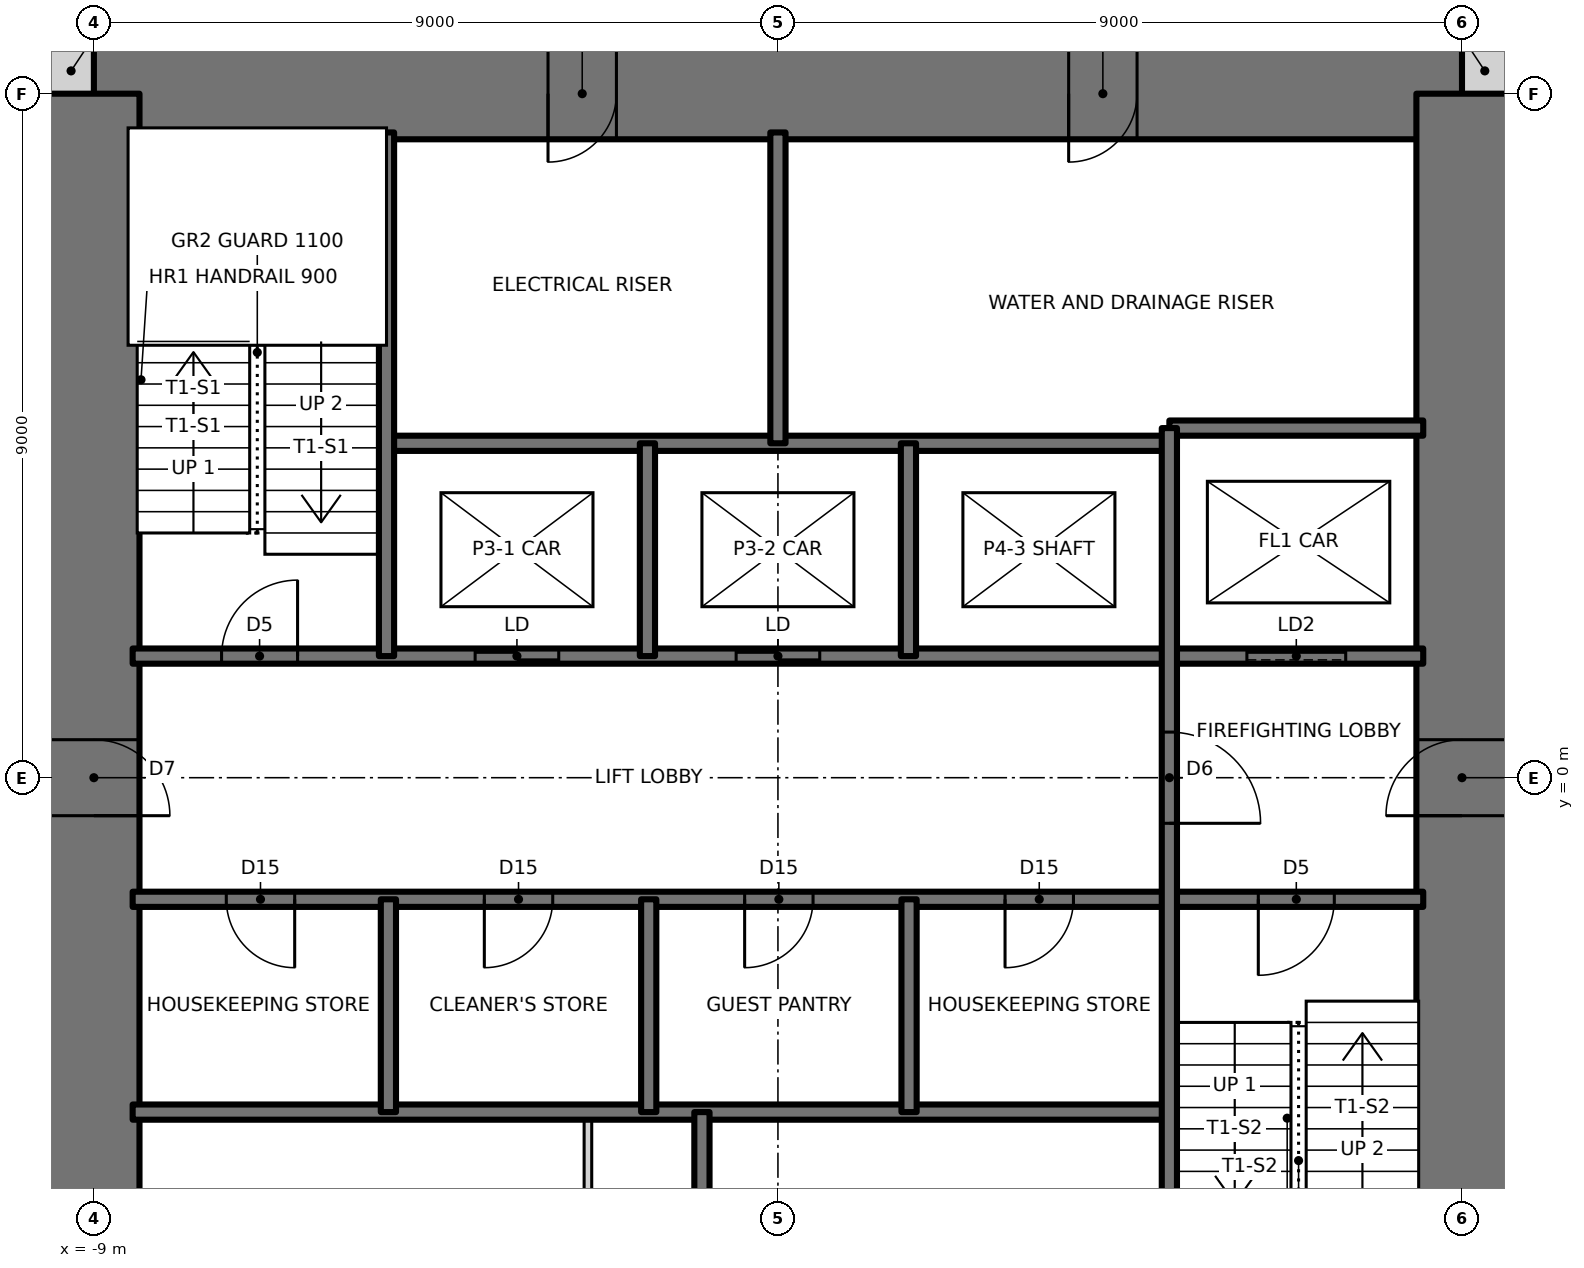
"""IFC4 building model, lengths in metres.
Left out: names, types, materials, properties, quantities, classifications, styles, units other than length and angle.
Written with IfcOpenShell. Run it as: python <this file> out.ifc"""

import sys

from ifc_helpers import new_model, si_unit, direction, frame, frame_2d, origin, place, context, subcontext, project, spatial, rectangle, extrude, element, fill, save


model = new_model("IFC4")
c1 = context("Model", 3, precision=1e-05, world=origin(), true_north=direction((0.0, 1.0)))
c2 = subcontext(c1, "Body", "Model", "MODEL_VIEW")
j1 = project(units=[si_unit("LENGTHUNIT", "METRE"), si_unit("PLANEANGLEUNIT", "RADIAN")], contexts=[c1])
p1 = place(None, origin())
s1 = spatial("IfcSite", under=j1, at=p1, CompositionType="ELEMENT")
p2 = place(p1, origin())
s2 = spatial("IfcBuilding", under=s1, at=p2, CompositionType="ELEMENT")
p3 = place(p2, frame((0.0, 0.0, 156.5)))
s3 = spatial("IfcBuildingStorey", under=s2, at=p3, CompositionType="ELEMENT", Elevation=156.5)
for number, where, z_axis, x_axis in (
    (1, (9.0, 9.3, 0.0), (0.0, 0.0, 1.0), (1.0, 0.0, 0.0)),
    (2, (-9.6, 9.3, 0.0), (0.0, 0.0, 1.0), (1.0, 0.0, 0.0)),
):
    element("IfcWall", number, at=place(p3, frame(where, z_axis=z_axis, x_axis=x_axis)), inside=s3, PredefinedType="SOLIDWALL", context=c2, shape_type="SweptSolid", body=[
        extrude(rectangle(XDim=0.6, YDim=0.6, at=frame_2d((0.3, 0.0))), origin(), (0.0, 0.0, 1.0), 3.5),
    ])
p4 = place(p3, frame((9.0, 9.0, 0.0), z_axis=(0.0, 0.0, 1.0), x_axis=(-1.0, 0.0, 0.0)))
e3 = element("IfcWall", 3, at=p4, inside=s3, PredefinedType="SHEAR", context=c2, shape_type="SweptSolid", body=[
    extrude(rectangle(XDim=18.0, YDim=1.2, at=frame_2d((9.0, 0.0))), origin(), (0.0, 0.0, 1.0), 3.5),
])
p5 = place(p4, frame((11.125, 0.0, 0.0)))
e4 = element("IfcOpeningElement", 4, at=p5, cuts=e3, PredefinedType="OPENING", context=c2, shape_type="SweptSolid", body=[
    extrude(rectangle(XDim=0.9, YDim=2.1, at=frame_2d((0.45, 1.05))), frame((0.0, 0.61, 0.0), z_axis=(0.0, -1.0, 0.0), x_axis=(1.0, 0.0, 0.0)), (0.0, 0.0, 1.0), 1.22),
])
p6 = place(p4, frame((4.275, 0.0, 0.0)))
e5 = element("IfcOpeningElement", 5, at=p6, cuts=e3, PredefinedType="OPENING", context=c2, shape_type="SweptSolid", body=[
    extrude(rectangle(XDim=0.9, YDim=2.1, at=frame_2d((0.45, 1.05))), frame((0.0, 0.61, 0.0), z_axis=(0.0, -1.0, 0.0), x_axis=(1.0, 0.0, 0.0)), (0.0, 0.0, 1.0), 1.22),
])
p7 = place(p3, frame((9.0, -9.0, 0.0), z_axis=(0.0, 0.0, 1.0), x_axis=(0.0, 1.0, 0.0)))
e6 = element("IfcWall", 6, at=p7, inside=s3, PredefinedType="SHEAR", context=c2, shape_type="SweptSolid", body=[
    extrude(rectangle(XDim=18.0, YDim=1.2, at=frame_2d((9.0, 0.0))), origin(), (0.0, 0.0, 1.0), 3.5),
])
p8 = place(p7, frame((8.5, 0.0, 0.0)))
e7 = element("IfcOpeningElement", 7, at=p8, cuts=e6, PredefinedType="OPENING", context=c2, shape_type="SweptSolid", body=[
    extrude(rectangle(XDim=1.0, YDim=2.1, at=frame_2d((0.5, 1.05))), frame((0.0, 0.61, 0.0), z_axis=(0.0, -1.0, 0.0), x_axis=(1.0, 0.0, 0.0)), (0.0, 0.0, 1.0), 1.22),
])
p9 = place(p3, frame((-9.0, 9.0, 0.0), z_axis=(0.0, 0.0, 1.0), x_axis=(0.0, -1.0, 0.0)))
e8 = element("IfcWall", 8, at=p9, inside=s3, PredefinedType="SHEAR", context=c2, shape_type="SweptSolid", body=[
    extrude(rectangle(XDim=18.0, YDim=1.2, at=frame_2d((9.0, 0.0))), origin(), (0.0, 0.0, 1.0), 3.5),
])
p10 = place(p9, frame((8.5, 0.0, 0.0)))
e9 = element("IfcOpeningElement", 9, at=p10, cuts=e8, PredefinedType="OPENING", context=c2, shape_type="SweptSolid", body=[
    extrude(rectangle(XDim=1.0, YDim=2.1, at=frame_2d((0.5, 1.05))), frame((0.0, 0.61, 0.0), z_axis=(0.0, -1.0, 0.0), x_axis=(1.0, 0.0, 0.0)), (0.0, 0.0, 1.0), 1.22),
])
p11 = place(p3, frame((-8.49, -4.4, 0.0), z_axis=(0.0, 0.0, 1.0), x_axis=(1.0, 0.0, 0.0)))
e10 = element("IfcWall", 10, at=p11, inside=s3, PredefinedType="SOLIDWALL", context=c2, shape_type="SweptSolid", body=[
    extrude(rectangle(XDim=13.64, YDim=0.2, at=frame_2d((6.82, 0.0))), origin(), (0.0, 0.0, 1.0), 3.5),
])
p12 = place(p3, frame((-8.49, -1.6, 0.0), z_axis=(0.0, 0.0, 1.0), x_axis=(1.0, 0.0, 0.0)))
e11 = element("IfcWall", 11, at=p12, inside=s3, PredefinedType="SOLIDWALL", context=c2, shape_type="SweptSolid", body=[
    extrude(rectangle(XDim=16.98, YDim=0.2, at=frame_2d((8.49, 0.0))), origin(), (0.0, 0.0, 1.0), 3.5),
])
p13 = place(p12, frame((14.81, 0.0, 0.0)))
e12 = element("IfcOpeningElement", 12, at=p13, cuts=e11, PredefinedType="OPENING", context=c2, shape_type="SweptSolid", body=[
    extrude(rectangle(XDim=1.0, YDim=2.1, at=frame_2d((0.5, 1.05))), frame((0.0, 0.11, 0.0), z_axis=(0.0, -1.0, 0.0), x_axis=(1.0, 0.0, 0.0)), (0.0, 0.0, 1.0), 0.22),
])
p14 = place(p12, frame((1.232, 0.0, 0.0)))
e13 = element("IfcOpeningElement", 13, at=p14, cuts=e11, PredefinedType="OPENING", context=c2, shape_type="SweptSolid", body=[
    extrude(rectangle(XDim=0.9, YDim=2.1, at=frame_2d((0.45, 1.05))), frame((0.0, 0.11, 0.0), z_axis=(0.0, -1.0, 0.0), x_axis=(1.0, 0.0, 0.0)), (0.0, 0.0, 1.0), 0.22),
])
p15 = place(p12, frame((4.627, 0.0, 0.0)))
e14 = element("IfcOpeningElement", 14, at=p15, cuts=e11, PredefinedType="OPENING", context=c2, shape_type="SweptSolid", body=[
    extrude(rectangle(XDim=0.9, YDim=2.1, at=frame_2d((0.45, 1.05))), frame((0.0, 0.11, 0.0), z_axis=(0.0, -1.0, 0.0), x_axis=(1.0, 0.0, 0.0)), (0.0, 0.0, 1.0), 0.22),
])
p16 = place(p12, frame((8.052, 0.0, 0.0)))
e15 = element("IfcOpeningElement", 15, at=p16, cuts=e11, PredefinedType="OPENING", context=c2, shape_type="SweptSolid", body=[
    extrude(rectangle(XDim=0.9, YDim=2.1, at=frame_2d((0.45, 1.05))), frame((0.0, 0.11, 0.0), z_axis=(0.0, -1.0, 0.0), x_axis=(1.0, 0.0, 0.0)), (0.0, 0.0, 1.0), 0.22),
])
p17 = place(p12, frame((11.478, 0.0, 0.0)))
e16 = element("IfcOpeningElement", 16, at=p17, cuts=e11, PredefinedType="OPENING", context=c2, shape_type="SweptSolid", body=[
    extrude(rectangle(XDim=0.9, YDim=2.1, at=frame_2d((0.45, 1.05))), frame((0.0, 0.11, 0.0), z_axis=(0.0, -1.0, 0.0), x_axis=(1.0, 0.0, 0.0)), (0.0, 0.0, 1.0), 0.22),
])
p18 = place(p3, frame((-8.49, 1.6, 0.0), z_axis=(0.0, 0.0, 1.0), x_axis=(1.0, 0.0, 0.0)))
e17 = element("IfcWall", 17, at=p18, inside=s3, PredefinedType="SOLIDWALL", context=c2, shape_type="SweptSolid", body=[
    extrude(rectangle(XDim=16.98, YDim=0.2, at=frame_2d((8.49, 0.0))), origin(), (0.0, 0.0, 1.0), 3.5),
])
p19 = place(p18, frame((1.17, 0.0, 0.0)))
e18 = element("IfcOpeningElement", 18, at=p19, cuts=e17, PredefinedType="OPENING", context=c2, shape_type="SweptSolid", body=[
    extrude(rectangle(XDim=1.0, YDim=2.1, at=frame_2d((0.5, 1.05))), frame((0.0, 0.11, 0.0), z_axis=(0.0, -1.0, 0.0), x_axis=(1.0, 0.0, 0.0)), (0.0, 0.0, 1.0), 0.22),
])
p20 = place(p18, frame((4.506, 0.0, 0.0)))
e19 = element("IfcOpeningElement", 19, at=p20, cuts=e17, PredefinedType="OPENING", context=c2, shape_type="SweptSolid", body=[
    extrude(rectangle(XDim=1.1, YDim=2.1, at=frame_2d((0.55, 1.05))), frame((0.0, 0.11, 0.0), z_axis=(0.0, -1.0, 0.0), x_axis=(1.0, 0.0, 0.0)), (0.0, 0.0, 1.0), 0.22),
])
p21 = place(p18, frame((7.94, 0.0, 0.0)))
e20 = element("IfcOpeningElement", 20, at=p21, cuts=e17, PredefinedType="OPENING", context=c2, shape_type="SweptSolid", body=[
    extrude(rectangle(XDim=1.1, YDim=2.1, at=frame_2d((0.55, 1.05))), frame((0.0, 0.11, 0.0), z_axis=(0.0, -1.0, 0.0), x_axis=(1.0, 0.0, 0.0)), (0.0, 0.0, 1.0), 0.22),
])
p22 = place(p18, frame((14.66, 0.0, 0.0)))
e21 = element("IfcOpeningElement", 21, at=p22, cuts=e17, PredefinedType="OPENING", context=c2, shape_type="SweptSolid", body=[
    extrude(rectangle(XDim=1.3, YDim=2.1, at=frame_2d((0.65, 1.05))), frame((0.0, 0.11, 0.0), z_axis=(0.0, -1.0, 0.0), x_axis=(1.0, 0.0, 0.0)), (0.0, 0.0, 1.0), 0.22),
])
p23 = place(p3, frame((-5.15, 4.4, 0.0), z_axis=(0.0, 0.0, 1.0), x_axis=(1.0, 0.0, 0.0)))
e22 = element("IfcWall", 22, at=p23, inside=s3, PredefinedType="SOLIDWALL", context=c2, shape_type="SweptSolid", body=[
    extrude(rectangle(XDim=10.3, YDim=0.2, at=frame_2d((5.15, 0.0))), origin(), (0.0, 0.0, 1.0), 3.5),
])
p24 = place(p3, frame((5.15, 4.6, 0.0), z_axis=(0.0, 0.0, 1.0), x_axis=(1.0, 0.0, 0.0)))
e23 = element("IfcWall", 23, at=p24, inside=s3, PredefinedType="SOLIDWALL", context=c2, shape_type="SweptSolid", body=[
    extrude(rectangle(XDim=3.34, YDim=0.2, at=frame_2d((1.67, 0.0))), origin(), (0.0, 0.0, 1.0), 3.5),
])
p25 = place(p3, frame((5.15, -8.49, 0.0), z_axis=(0.0, 0.0, 1.0), x_axis=(0.0, 1.0, 0.0)))
e24 = element("IfcWall", 24, at=p25, inside=s3, PredefinedType="SOLIDWALL", context=c2, shape_type="SweptSolid", body=[
    extrude(rectangle(XDim=13.09, YDim=0.2, at=frame_2d((6.545, 0.0))), origin(), (0.0, 0.0, 1.0), 3.5),
])
p26 = place(p25, frame((7.89, 0.0, 0.0)))
e25 = element("IfcOpeningElement", 25, at=p26, cuts=e24, PredefinedType="OPENING", context=c2, shape_type="SweptSolid", body=[
    extrude(rectangle(XDim=1.2, YDim=2.1, at=frame_2d((0.6, 1.05))), frame((0.0, 0.11, 0.0), z_axis=(0.0, -1.0, 0.0), x_axis=(1.0, 0.0, 0.0)), (0.0, 0.0, 1.0), 0.22),
])
for number, where, z_axis, x_axis in (
    (26, (1.725, -4.4, 0.0), (0.0, 0.0, 1.0), (0.0, 1.0, 0.0)),
    (27, (1.717, 1.6, 0.0), (0.0, 0.0, 1.0), (0.0, 1.0, 0.0)),
):
    element("IfcWall", number, at=place(p3, frame(where, z_axis=z_axis, x_axis=x_axis)), inside=s3, PredefinedType="SOLIDWALL", context=c2, shape_type="SweptSolid", body=[
        extrude(rectangle(XDim=2.8, YDim=0.2, at=frame_2d((1.4, 0.0))), origin(), (0.0, 0.0, 1.0), 3.5),
    ])
for number, where, z_axis, x_axis in (
    (28, (0.0, 4.4, 0.0), (0.0, 0.0, 1.0), (0.0, 1.0, 0.0)),
    (29, (-1.0, -8.49, 0.0), (0.0, 0.0, 1.0), (0.0, 1.0, 0.0)),
):
    element("IfcWall", number, at=place(p3, frame(where, z_axis=z_axis, x_axis=x_axis)), inside=s3, PredefinedType="SOLIDWALL", context=c2, shape_type="SweptSolid", body=[
        extrude(rectangle(XDim=4.09, YDim=0.2, at=frame_2d((2.045, 0.0))), origin(), (0.0, 0.0, 1.0), 3.5),
    ])
for number, where, z_axis, x_axis in (
    (30, (-1.7, -4.4, 0.0), (0.0, 0.0, 1.0), (0.0, 1.0, 0.0)),
    (31, (-1.717, 1.6, 0.0), (0.0, 0.0, 1.0), (0.0, 1.0, 0.0)),
):
    element("IfcWall", number, at=place(p3, frame(where, z_axis=z_axis, x_axis=x_axis)), inside=s3, PredefinedType="SOLIDWALL", context=c2, shape_type="SweptSolid", body=[
        extrude(rectangle(XDim=2.8, YDim=0.2, at=frame_2d((1.4, 0.0))), origin(), (0.0, 0.0, 1.0), 3.5),
    ])
p27 = place(p3, frame((-2.5, -8.49, 0.0), z_axis=(0.0, 0.0, 1.0), x_axis=(0.0, 1.0, 0.0)))
e32 = element("IfcWall", 32, at=p27, inside=s3, PredefinedType="PARTITIONING", context=c2, shape_type="SweptSolid", body=[
    extrude(rectangle(XDim=4.09, YDim=0.1, at=frame_2d((2.045, 0.0))), origin(), (0.0, 0.0, 1.0), 3.3),
])
p28 = place(p27, frame((1.595, 0.0, 0.0)))
e33 = element("IfcOpeningElement", 33, at=p28, cuts=e32, PredefinedType="OPENING", context=c2, shape_type="SweptSolid", body=[
    extrude(rectangle(XDim=0.9, YDim=2.1, at=frame_2d((0.45, 1.05))), frame((0.0, 0.06, 0.0), z_axis=(0.0, -1.0, 0.0), x_axis=(1.0, 0.0, 0.0)), (0.0, 0.0, 1.0), 0.12),
])
p29 = place(p3, frame((-5.125, -4.4, 0.0), z_axis=(0.0, 0.0, 1.0), x_axis=(0.0, 1.0, 0.0)))
e34 = element("IfcWall", 34, at=p29, inside=s3, PredefinedType="SOLIDWALL", context=c2, shape_type="SweptSolid", body=[
    extrude(rectangle(XDim=2.8, YDim=0.2, at=frame_2d((1.4, 0.0))), origin(), (0.0, 0.0, 1.0), 3.5),
])
p30 = place(p3, frame((-5.15, 1.6, 0.0), z_axis=(0.0, 0.0, 1.0), x_axis=(0.0, 1.0, 0.0)))
e35 = element("IfcWall", 35, at=p30, inside=s3, PredefinedType="SOLIDWALL", context=c2, shape_type="SweptSolid", body=[
    extrude(rectangle(XDim=6.89, YDim=0.2, at=frame_2d((3.445, 0.0))), origin(), (0.0, 0.0, 1.0), 3.5),
])
p31 = place(p19, origin())
e36 = element("IfcDoor", 36, at=p31, inside=s3, OperationType="SINGLE_SWING_RIGHT", PredefinedType="DOOR", context=c2, shape_type="SweptSolid", body=[
    extrude(rectangle(XDim=1.0, YDim=2.1, at=frame_2d((0.5, 1.05))), frame((0.0, 0.025, 0.0), z_axis=(0.0, -1.0, 0.0), x_axis=(1.0, 0.0, 0.0)), (0.0, 0.0, 1.0), 0.05),
])
fill(e18, e36)
p32 = place(p13, frame((1.0, 0.0, 0.0), z_axis=(0.0, 0.0, 1.0), x_axis=(-1.0, 0.0, 0.0)))
e37 = element("IfcDoor", 37, at=p32, inside=s3, OperationType="SINGLE_SWING_RIGHT", PredefinedType="DOOR", context=c2, shape_type="SweptSolid", body=[
    extrude(rectangle(XDim=1.0, YDim=2.1, at=frame_2d((0.5, 1.05))), frame((0.0, 0.025, 0.0), z_axis=(0.0, -1.0, 0.0), x_axis=(1.0, 0.0, 0.0)), (0.0, 0.0, 1.0), 0.05),
])
fill(e12, e37)
p33 = place(p26, frame((1.2, 0.0, 0.0), z_axis=(0.0, 0.0, 1.0), x_axis=(-1.0, 0.0, 0.0)))
e38 = element("IfcDoor", 38, at=p33, inside=s3, OperationType="SINGLE_SWING_RIGHT", PredefinedType="DOOR", context=c2, shape_type="SweptSolid", body=[
    extrude(rectangle(XDim=1.2, YDim=2.1, at=frame_2d((0.6, 1.05))), frame((0.0, 0.025, 0.0), z_axis=(0.0, -1.0, 0.0), x_axis=(1.0, 0.0, 0.0)), (0.0, 0.0, 1.0), 0.05),
])
fill(e25, e38)
p34 = place(p14, frame((0.9, 0.0, 0.0), z_axis=(0.0, 0.0, 1.0), x_axis=(-1.0, 0.0, 0.0)))
e39 = element("IfcDoor", 39, at=p34, inside=s3, OperationType="SINGLE_SWING_LEFT", PredefinedType="DOOR", context=c2, shape_type="SweptSolid", body=[
    extrude(rectangle(XDim=0.9, YDim=2.1, at=frame_2d((0.45, 1.05))), frame((0.0, 0.025, 0.0), z_axis=(0.0, -1.0, 0.0), x_axis=(1.0, 0.0, 0.0)), (0.0, 0.0, 1.0), 0.05),
])
fill(e13, e39)
p35 = place(p15, frame((0.9, 0.0, 0.0), z_axis=(0.0, 0.0, 1.0), x_axis=(-1.0, 0.0, 0.0)))
e40 = element("IfcDoor", 40, at=p35, inside=s3, OperationType="SINGLE_SWING_RIGHT", PredefinedType="DOOR", context=c2, shape_type="SweptSolid", body=[
    extrude(rectangle(XDim=0.9, YDim=2.1, at=frame_2d((0.45, 1.05))), frame((0.0, 0.025, 0.0), z_axis=(0.0, -1.0, 0.0), x_axis=(1.0, 0.0, 0.0)), (0.0, 0.0, 1.0), 0.05),
])
fill(e14, e40)
p36 = place(p16, frame((0.9, 0.0, 0.0), z_axis=(0.0, 0.0, 1.0), x_axis=(-1.0, 0.0, 0.0)))
e41 = element("IfcDoor", 41, at=p36, inside=s3, OperationType="SINGLE_SWING_RIGHT", PredefinedType="DOOR", context=c2, shape_type="SweptSolid", body=[
    extrude(rectangle(XDim=0.9, YDim=2.1, at=frame_2d((0.45, 1.05))), frame((0.0, 0.025, 0.0), z_axis=(0.0, -1.0, 0.0), x_axis=(1.0, 0.0, 0.0)), (0.0, 0.0, 1.0), 0.05),
])
fill(e15, e41)
p37 = place(p17, frame((0.9, 0.0, 0.0), z_axis=(0.0, 0.0, 1.0), x_axis=(-1.0, 0.0, 0.0)))
e42 = element("IfcDoor", 42, at=p37, inside=s3, OperationType="SINGLE_SWING_RIGHT", PredefinedType="DOOR", context=c2, shape_type="SweptSolid", body=[
    extrude(rectangle(XDim=0.9, YDim=2.1, at=frame_2d((0.45, 1.05))), frame((0.0, 0.025, 0.0), z_axis=(0.0, -1.0, 0.0), x_axis=(1.0, 0.0, 0.0)), (0.0, 0.0, 1.0), 0.05),
])
fill(e16, e42)
p38 = place(p10, origin())
e43 = element("IfcDoor", 43, at=p38, inside=s3, OperationType="SINGLE_SWING_RIGHT", PredefinedType="DOOR", context=c2, shape_type="SweptSolid", body=[
    extrude(rectangle(XDim=1.0, YDim=2.1, at=frame_2d((0.5, 1.05))), frame((0.0, 0.025, 0.0), z_axis=(0.0, -1.0, 0.0), x_axis=(1.0, 0.0, 0.0)), (0.0, 0.0, 1.0), 0.05),
])
fill(e9, e43)
p39 = place(p8, origin())
e44 = element("IfcDoor", 44, at=p39, inside=s3, OperationType="SINGLE_SWING_LEFT", PredefinedType="DOOR", context=c2, shape_type="SweptSolid", body=[
    extrude(rectangle(XDim=1.0, YDim=2.1, at=frame_2d((0.5, 1.05))), frame((0.0, 0.025, 0.0), z_axis=(0.0, -1.0, 0.0), x_axis=(1.0, 0.0, 0.0)), (0.0, 0.0, 1.0), 0.05),
])
fill(e7, e44)
p40 = place(p5, origin())
e45 = element("IfcDoor", 45, at=p40, inside=s3, OperationType="SINGLE_SWING_RIGHT", PredefinedType="DOOR", context=c2, shape_type="SweptSolid", body=[
    extrude(rectangle(XDim=0.9, YDim=2.1, at=frame_2d((0.45, 1.05))), frame((0.0, 0.025, 0.0), z_axis=(0.0, -1.0, 0.0), x_axis=(1.0, 0.0, 0.0)), (0.0, 0.0, 1.0), 0.05),
])
fill(e4, e45)
p41 = place(p6, origin())
e46 = element("IfcDoor", 46, at=p41, inside=s3, OperationType="SINGLE_SWING_RIGHT", PredefinedType="DOOR", context=c2, shape_type="SweptSolid", body=[
    extrude(rectangle(XDim=0.9, YDim=2.1, at=frame_2d((0.45, 1.05))), frame((0.0, 0.025, 0.0), z_axis=(0.0, -1.0, 0.0), x_axis=(1.0, 0.0, 0.0)), (0.0, 0.0, 1.0), 0.05),
])
fill(e5, e46)
p42 = place(p20, origin())
e47 = element("IfcDoor", 47, at=p42, inside=s3, OperationType="DOUBLE_DOOR_SLIDING", PredefinedType="DOOR", context=c2, shape_type="SweptSolid", body=[
    extrude(rectangle(XDim=1.1, YDim=2.1, at=frame_2d((0.55, 1.05))), frame((0.0, 0.025, 0.0), z_axis=(0.0, -1.0, 0.0), x_axis=(1.0, 0.0, 0.0)), (0.0, 0.0, 1.0), 0.05),
])
fill(e19, e47)
p43 = place(p21, origin())
e48 = element("IfcDoor", 48, at=p43, inside=s3, OperationType="DOUBLE_DOOR_SLIDING", PredefinedType="DOOR", context=c2, shape_type="SweptSolid", body=[
    extrude(rectangle(XDim=1.1, YDim=2.1, at=frame_2d((0.55, 1.05))), frame((0.0, 0.025, 0.0), z_axis=(0.0, -1.0, 0.0), x_axis=(1.0, 0.0, 0.0)), (0.0, 0.0, 1.0), 0.05),
])
fill(e20, e48)
p44 = place(p22, origin())
e49 = element("IfcDoor", 49, at=p44, inside=s3, OperationType="SLIDING_TO_LEFT", PredefinedType="DOOR", context=c2, shape_type="SweptSolid", body=[
    extrude(rectangle(XDim=1.3, YDim=2.1, at=frame_2d((0.65, 1.05))), frame((0.0, 0.025, 0.0), z_axis=(0.0, -1.0, 0.0), x_axis=(1.0, 0.0, 0.0)), (0.0, 0.0, 1.0), 0.05),
])
fill(e21, e49)
save(model, sys.argv[1])
